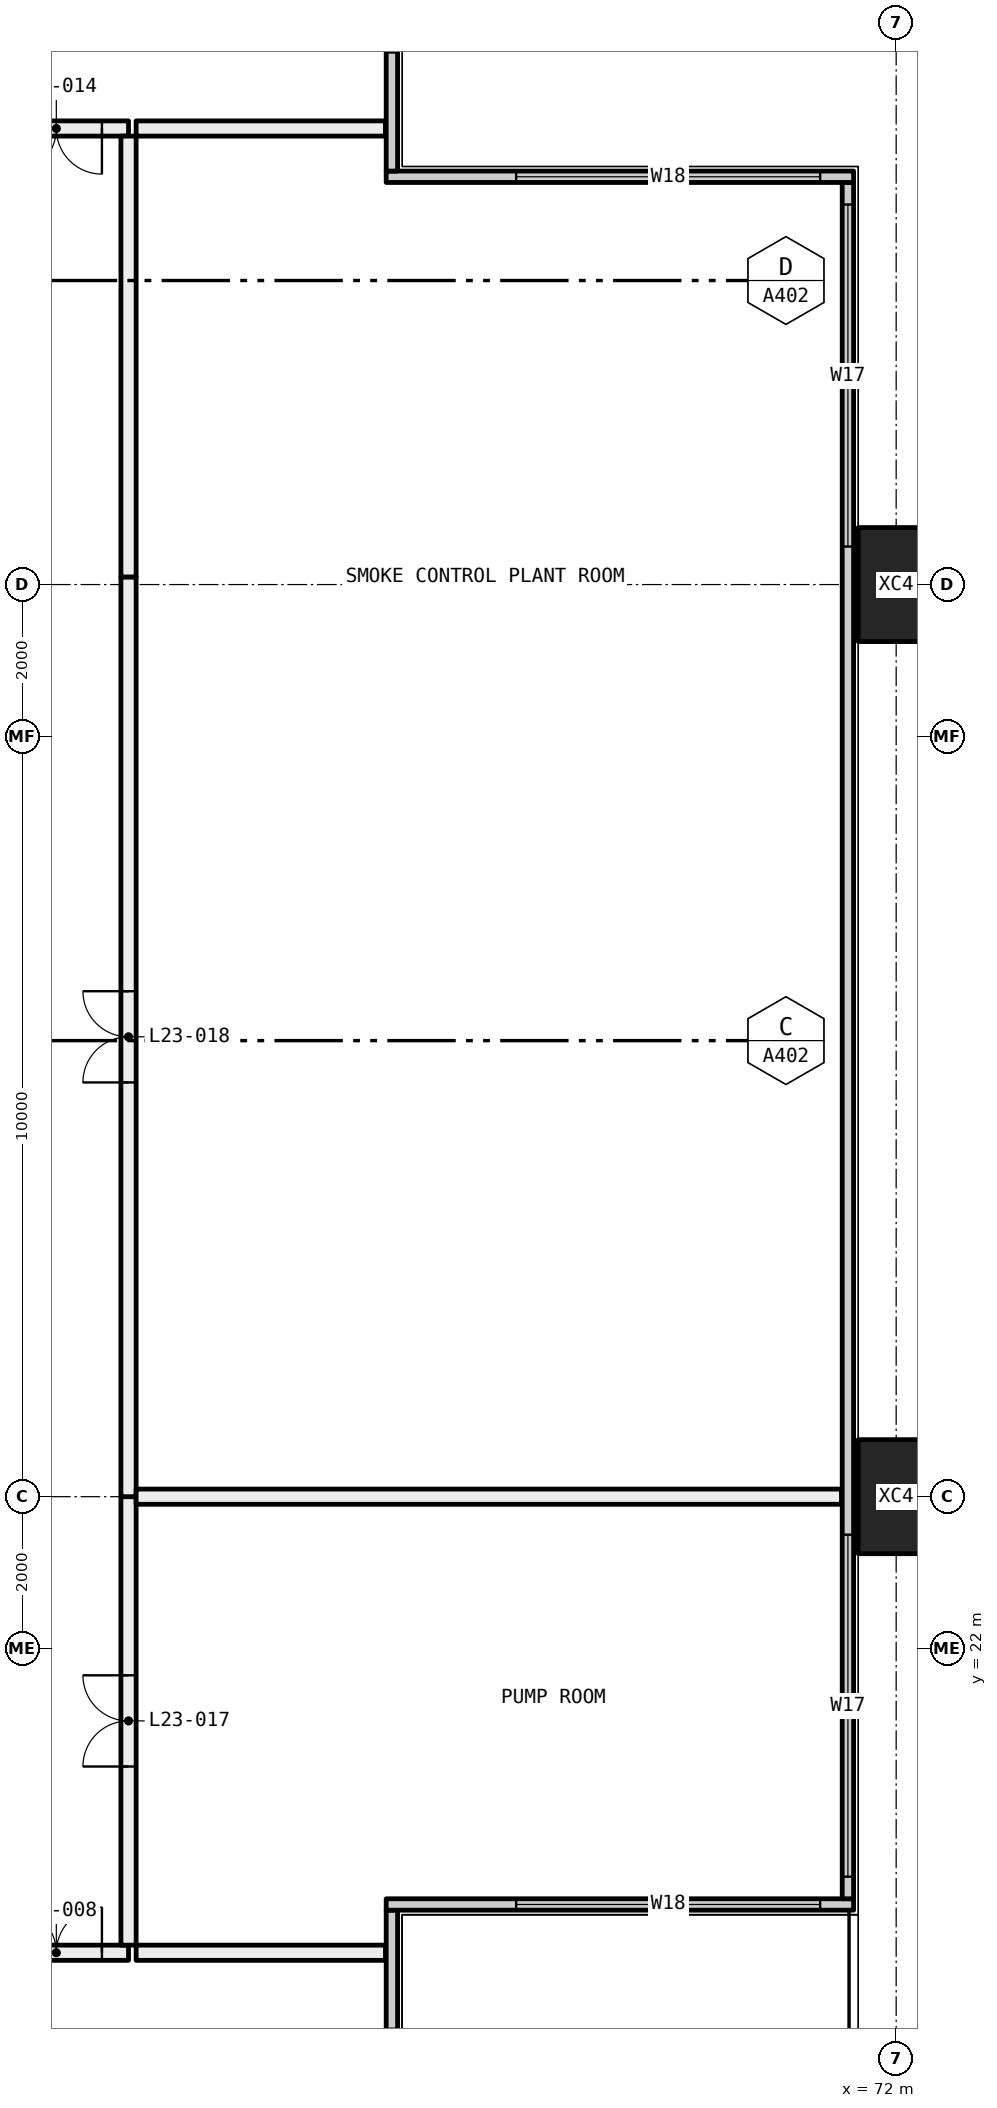
"""IFC4 building model, lengths in metres.
Left out: names, types, materials, properties, quantities, classifications, styles, units other than length and angle.
Written with IfcOpenShell. Run it as: python <this file> out.ifc"""

import sys

from ifc_helpers import new_model, si_unit, direction, frame, frame_2d, origin, origin_2d, place, context, subcontext, project, spatial, rectangle, hollow_rectangle, extrude, element, fill, save


model = new_model("IFC4")
c1 = context("Model", 3, precision=1e-05, world=origin(), true_north=direction((0.0, 1.0)))
c2 = subcontext(c1, "Body", "Model", "MODEL_VIEW")
j1 = project(units=[si_unit("LENGTHUNIT", "METRE"), si_unit("PLANEANGLEUNIT", "RADIAN")], contexts=[c1])
p1 = place(None, origin())
s1 = spatial("IfcSite", under=j1, at=p1, CompositionType="ELEMENT")
p2 = place(p1, origin())
s2 = spatial("IfcBuilding", under=s1, at=p2, CompositionType="ELEMENT")
p3 = place(p2, frame((0.0, 0.0, 92.1)))
s3 = spatial("IfcBuildingStorey", under=s2, at=p3, CompositionType="ELEMENT", Elevation=92.1)
for number, where, z_axis, x_axis in (
    (1, (72.0, 24.0, -0.4), (0.0, 0.0, 1.0), (0.0, 1.0, 0.0)),
    (2, (72.0, 36.0, -0.4), (0.0, 0.0, 1.0), (0.0, 1.0, 0.0)),
):
    element("IfcColumn", number, at=place(p3, frame(where, z_axis=z_axis, x_axis=x_axis)), inside=s3, PredefinedType="COLUMN", context=c2, shape_type="SweptSolid", body=[
        extrude(hollow_rectangle(XDim=1.5, YDim=1.0, WallThickness=0.06, at=origin_2d()), origin(), (0.0, 0.0, 1.0), 4.5),
    ])
p4 = place(p3, frame((65.365, 12.71, 0.0), z_axis=(0.0, 0.0, 1.0), x_axis=(0.0, 1.0, 0.0)))
e3 = element("IfcWall", 3, at=p4, inside=s3, PredefinedType="ELEMENTEDWALL", context=c2, shape_type="SweptSolid", body=[
    extrude(rectangle(XDim=5.85, YDim=0.15, at=frame_2d((2.925, 0.0))), origin(), (0.0, 0.0, 1.0), 4.1),
])
p5 = place(p4, frame((0.29, 0.0, 0.45)))
e4 = element("IfcOpeningElement", 4, at=p5, cuts=e3, PredefinedType="OPENING", context=c2, shape_type="SweptSolid", body=[
    extrude(rectangle(XDim=4.0, YDim=3.6, at=frame_2d((2.0, 1.8))), frame((0.0, 0.085, 0.0), z_axis=(0.0, -1.0, 0.0), x_axis=(1.0, 0.0, 0.0)), (0.0, 0.0, 1.0), 0.17),
])
p6 = place(p3, frame((65.29, 18.635, 0.0), z_axis=(0.0, 0.0, 1.0), x_axis=(1.0, 0.0, 0.0)))
e5 = element("IfcWall", 5, at=p6, inside=s3, PredefinedType="ELEMENTEDWALL", context=c2, shape_type="SweptSolid", body=[
    extrude(rectangle(XDim=6.15, YDim=0.15, at=frame_2d((3.075, 0.0))), origin(), (0.0, 0.0, 1.0), 4.1),
])
p7 = place(p6, frame((1.71, 0.0, 0.45)))
e6 = element("IfcOpeningElement", 6, at=p7, cuts=e5, PredefinedType="OPENING", context=c2, shape_type="SweptSolid", body=[
    extrude(rectangle(XDim=4.0, YDim=3.6, at=frame_2d((2.0, 1.8))), frame((0.0, 0.085, 0.0), z_axis=(0.0, -1.0, 0.0), x_axis=(1.0, 0.0, 0.0)), (0.0, 0.0, 1.0), 0.17),
])
p8 = place(p3, frame((71.365, 18.71, 0.0), z_axis=(0.0, 0.0, 1.0), x_axis=(0.0, 1.0, 0.0)))
e7 = element("IfcWall", 7, at=p8, inside=s3, PredefinedType="ELEMENTEDWALL", context=c2, shape_type="SweptSolid", body=[
    extrude(rectangle(XDim=22.58, YDim=0.15, at=frame_2d((11.29, 0.0))), origin(), (0.0, 0.0, 1.0), 4.1),
])
p9 = place(p8, frame((0.29, 0.0, 0.45)))
e8 = element("IfcOpeningElement", 8, at=p9, cuts=e7, PredefinedType="OPENING", context=c2, shape_type="SweptSolid", body=[
    extrude(rectangle(XDim=4.5, YDim=3.6, at=frame_2d((2.25, 1.8))), frame((0.0, 0.085, 0.0), z_axis=(0.0, -1.0, 0.0), x_axis=(1.0, 0.0, 0.0)), (0.0, 0.0, 1.0), 0.17),
])
p10 = place(p8, frame((17.79, 0.0, 0.45)))
e9 = element("IfcOpeningElement", 9, at=p10, cuts=e7, PredefinedType="OPENING", context=c2, shape_type="SweptSolid", body=[
    extrude(rectangle(XDim=4.5, YDim=3.6, at=frame_2d((2.25, 1.8))), frame((0.0, 0.085, 0.0), z_axis=(0.0, -1.0, 0.0), x_axis=(1.0, 0.0, 0.0)), (0.0, 0.0, 1.0), 0.17),
])
p11 = place(p3, frame((65.29, 41.365, 0.0), z_axis=(0.0, 0.0, 1.0), x_axis=(1.0, 0.0, 0.0)))
e10 = element("IfcWall", 10, at=p11, inside=s3, PredefinedType="ELEMENTEDWALL", context=c2, shape_type="SweptSolid", body=[
    extrude(rectangle(XDim=6.15, YDim=0.15, at=frame_2d((3.075, 0.0))), origin(), (0.0, 0.0, 1.0), 4.1),
])
p12 = place(p11, frame((1.71, 0.0, 0.45)))
e11 = element("IfcOpeningElement", 11, at=p12, cuts=e10, PredefinedType="OPENING", context=c2, shape_type="SweptSolid", body=[
    extrude(rectangle(XDim=4.0, YDim=3.6, at=frame_2d((2.0, 1.8))), frame((0.0, 0.085, 0.0), z_axis=(0.0, -1.0, 0.0), x_axis=(1.0, 0.0, 0.0)), (0.0, 0.0, 1.0), 0.17),
])
p13 = place(p3, frame((65.365, 41.44, 0.0), z_axis=(0.0, 0.0, 1.0), x_axis=(0.0, 1.0, 0.0)))
e12 = element("IfcWall", 12, at=p13, inside=s3, PredefinedType="ELEMENTEDWALL", context=c2, shape_type="SweptSolid", body=[
    extrude(rectangle(XDim=5.85, YDim=0.15, at=frame_2d((2.925, 0.0))), origin(), (0.0, 0.0, 1.0), 4.1),
])
p14 = place(p13, frame((1.56, 0.0, 0.45)))
e13 = element("IfcOpeningElement", 13, at=p14, cuts=e12, PredefinedType="OPENING", context=c2, shape_type="SweptSolid", body=[
    extrude(rectangle(XDim=4.0, YDim=3.6, at=frame_2d((2.0, 1.8))), frame((0.0, 0.085, 0.0), z_axis=(0.0, -1.0, 0.0), x_axis=(1.0, 0.0, 0.0)), (0.0, 0.0, 1.0), 0.17),
])
p15 = place(p3, frame((60.0, 18.0, 0.0), z_axis=(0.0, 0.0, 1.0), x_axis=(1.0, 0.0, 0.0)))
e14 = element("IfcWall", 14, at=p15, inside=s3, PredefinedType="PARTITIONING", context=c2, shape_type="SweptSolid", body=[
    extrude(rectangle(XDim=1.9, YDim=0.2, at=frame_2d((0.95, 0.0))), origin(), (0.0, 0.0, 1.0), 4.1),
])
p16 = place(p15, frame((0.35, 0.0, 0.0)))
e15 = element("IfcOpeningElement", 15, at=p16, cuts=e14, PredefinedType="OPENING", context=c2, shape_type="SweptSolid", body=[
    extrude(rectangle(XDim=1.2, YDim=2.1, at=frame_2d((0.6, 1.05))), frame((0.0, 0.11, 0.0), z_axis=(0.0, -1.0, 0.0), x_axis=(1.0, 0.0, 0.0)), (0.0, 0.0, 1.0), 0.22),
])
p17 = place(p3, frame((61.9, 42.0, 0.0), z_axis=(0.0, 0.0, 1.0), x_axis=(-1.0, 0.0, 0.0)))
e16 = element("IfcWall", 16, at=p17, inside=s3, PredefinedType="PARTITIONING", context=c2, shape_type="SweptSolid", body=[
    extrude(rectangle(XDim=1.9, YDim=0.2, at=frame_2d((0.95, 0.0))), origin(), (0.0, 0.0, 1.0), 4.1),
])
p18 = place(p17, frame((0.35, 0.0, 0.0)))
e17 = element("IfcOpeningElement", 17, at=p18, cuts=e16, PredefinedType="OPENING", context=c2, shape_type="SweptSolid", body=[
    extrude(rectangle(XDim=1.2, YDim=2.1, at=frame_2d((0.6, 1.05))), frame((0.0, 0.11, 0.0), z_axis=(0.0, -1.0, 0.0), x_axis=(1.0, 0.0, 0.0)), (0.0, 0.0, 1.0), 0.22),
])
p19 = place(p3, frame((61.9, 18.1, 0.0), z_axis=(0.0, 0.0, 1.0), x_axis=(0.0, 1.0, 0.0)))
e18 = element("IfcWall", 18, at=p19, inside=s3, PredefinedType="PARTITIONING", context=c2, shape_type="SweptSolid", body=[
    extrude(rectangle(XDim=5.9, YDim=0.2, at=frame_2d((2.95, 0.0))), origin(), (0.0, 0.0, 1.0), 3.5),
])
p20 = place(p19, frame((2.35, 0.0, 0.0)))
e19 = element("IfcOpeningElement", 19, at=p20, cuts=e18, PredefinedType="OPENING", context=c2, shape_type="SweptSolid", body=[
    extrude(rectangle(XDim=1.2, YDim=2.1, at=frame_2d((0.6, 1.05))), frame((0.0, 0.11, 0.0), z_axis=(0.0, -1.0, 0.0), x_axis=(1.0, 0.0, 0.0)), (0.0, 0.0, 1.0), 0.22),
])
p21 = place(p3, frame((61.9, 24.0, 0.0), z_axis=(0.0, 0.0, 1.0), x_axis=(0.0, 1.0, 0.0)))
e20 = element("IfcWall", 20, at=p21, inside=s3, PredefinedType="PARTITIONING", context=c2, shape_type="SweptSolid", body=[
    extrude(rectangle(XDim=12.1, YDim=0.2, at=frame_2d((6.05, 0.0))), origin(), (0.0, 0.0, 1.0), 3.5),
])
p22 = place(p21, frame((5.45, 0.0, 0.0)))
e21 = element("IfcOpeningElement", 21, at=p22, cuts=e20, PredefinedType="OPENING", context=c2, shape_type="SweptSolid", body=[
    extrude(rectangle(XDim=1.2, YDim=2.1, at=frame_2d((0.6, 1.05))), frame((0.0, 0.11, 0.0), z_axis=(0.0, -1.0, 0.0), x_axis=(1.0, 0.0, 0.0)), (0.0, 0.0, 1.0), 0.22),
])
p23 = place(p3, frame((61.9, 36.1, 0.0), z_axis=(0.0, 0.0, 1.0), x_axis=(0.0, 1.0, 0.0)))
e22 = element("IfcWall", 22, at=p23, inside=s3, PredefinedType="PARTITIONING", context=c2, shape_type="SweptSolid", body=[
    extrude(rectangle(XDim=5.8, YDim=0.2, at=frame_2d((2.9, 0.0))), origin(), (0.0, 0.0, 1.0), 4.1),
])
for number, where, z_axis, x_axis in (
    (23, (65.28, 18.0, 0.0), (0.0, 0.0, 1.0), (-1.0, 0.0, 0.0)),
    (24, (62.0, 42.0, 0.0), (0.0, 0.0, 1.0), (1.0, 0.0, 0.0)),
):
    element("IfcWall", number, at=place(p3, frame(where, z_axis=z_axis, x_axis=x_axis)), inside=s3, PredefinedType="PARTITIONING", context=c2, shape_type="SweptSolid", body=[
        extrude(rectangle(XDim=3.28, YDim=0.2, at=frame_2d((1.64, 0.0))), origin(), (0.0, 0.0, 1.0), 4.1),
    ])
p24 = place(p3, frame((71.28, 24.0, 0.0), z_axis=(0.0, 0.0, 1.0), x_axis=(-1.0, 0.0, 0.0)))
e25 = element("IfcWall", 25, at=p24, inside=s3, PredefinedType="PARTITIONING", context=c2, shape_type="SweptSolid", body=[
    extrude(rectangle(XDim=9.28, YDim=0.2, at=frame_2d((4.64, 0.0))), origin(), (0.0, 0.0, 1.0), 3.5),
])
p25 = place(p7, origin())
e26 = element("IfcWindow", 26, at=p25, inside=s3, PartitioningType="SINGLE_PANEL", PredefinedType="WINDOW", context=c2, shape_type="SweptSolid", body=[
    extrude(rectangle(XDim=4.0, YDim=3.6, at=frame_2d((2.0, 1.8))), frame((0.0, 0.03, 0.0), z_axis=(0.0, -1.0, 0.0), x_axis=(1.0, 0.0, 0.0)), (0.0, 0.0, 1.0), 0.06),
])
fill(e6, e26)
p26 = place(p9, origin())
e27 = element("IfcWindow", 27, at=p26, inside=s3, PartitioningType="SINGLE_PANEL", PredefinedType="WINDOW", context=c2, shape_type="SweptSolid", body=[
    extrude(rectangle(XDim=4.5, YDim=3.6, at=frame_2d((2.25, 1.8))), frame((0.0, 0.03, 0.0), z_axis=(0.0, -1.0, 0.0), x_axis=(1.0, 0.0, 0.0)), (0.0, 0.0, 1.0), 0.06),
])
fill(e8, e27)
p27 = place(p10, origin())
e28 = element("IfcWindow", 28, at=p27, inside=s3, PartitioningType="SINGLE_PANEL", PredefinedType="WINDOW", context=c2, shape_type="SweptSolid", body=[
    extrude(rectangle(XDim=4.5, YDim=3.6, at=frame_2d((2.25, 1.8))), frame((0.0, 0.03, 0.0), z_axis=(0.0, -1.0, 0.0), x_axis=(1.0, 0.0, 0.0)), (0.0, 0.0, 1.0), 0.06),
])
fill(e9, e28)
p28 = place(p12, origin())
e29 = element("IfcWindow", 29, at=p28, inside=s3, PartitioningType="SINGLE_PANEL", PredefinedType="WINDOW", context=c2, shape_type="SweptSolid", body=[
    extrude(rectangle(XDim=4.0, YDim=3.6, at=frame_2d((2.0, 1.8))), frame((0.0, 0.03, 0.0), z_axis=(0.0, -1.0, 0.0), x_axis=(1.0, 0.0, 0.0)), (0.0, 0.0, 1.0), 0.06),
])
fill(e11, e29)
p29 = place(p16, origin())
e30 = element("IfcDoor", 30, at=p29, inside=s3, OperationType="DOUBLE_DOOR_SINGLE_SWING", PredefinedType="DOOR", context=c2, shape_type="SweptSolid", body=[
    extrude(rectangle(XDim=1.2, YDim=2.1, at=frame_2d((0.6, 1.05))), frame((0.0, 0.025, 0.0), z_axis=(0.0, -1.0, 0.0), x_axis=(1.0, 0.0, 0.0)), (0.0, 0.0, 1.0), 0.05),
])
fill(e15, e30)
p30 = place(p18, origin())
e31 = element("IfcDoor", 31, at=p30, inside=s3, OperationType="DOUBLE_DOOR_SINGLE_SWING", PredefinedType="DOOR", context=c2, shape_type="SweptSolid", body=[
    extrude(rectangle(XDim=1.2, YDim=2.1, at=frame_2d((0.6, 1.05))), frame((0.0, 0.025, 0.0), z_axis=(0.0, -1.0, 0.0), x_axis=(1.0, 0.0, 0.0)), (0.0, 0.0, 1.0), 0.05),
])
fill(e17, e31)
p31 = place(p20, origin())
e32 = element("IfcDoor", 32, at=p31, inside=s3, OperationType="DOUBLE_DOOR_SINGLE_SWING", PredefinedType="DOOR", context=c2, shape_type="SweptSolid", body=[
    extrude(rectangle(XDim=1.2, YDim=2.1, at=frame_2d((0.6, 1.05))), frame((0.0, 0.025, 0.0), z_axis=(0.0, -1.0, 0.0), x_axis=(1.0, 0.0, 0.0)), (0.0, 0.0, 1.0), 0.05),
])
fill(e19, e32)
p32 = place(p22, origin())
e33 = element("IfcDoor", 33, at=p32, inside=s3, OperationType="DOUBLE_DOOR_SINGLE_SWING", PredefinedType="DOOR", context=c2, shape_type="SweptSolid", body=[
    extrude(rectangle(XDim=1.2, YDim=2.1, at=frame_2d((0.6, 1.05))), frame((0.0, 0.025, 0.0), z_axis=(0.0, -1.0, 0.0), x_axis=(1.0, 0.0, 0.0)), (0.0, 0.0, 1.0), 0.05),
])
fill(e21, e33)
save(model, sys.argv[1])
